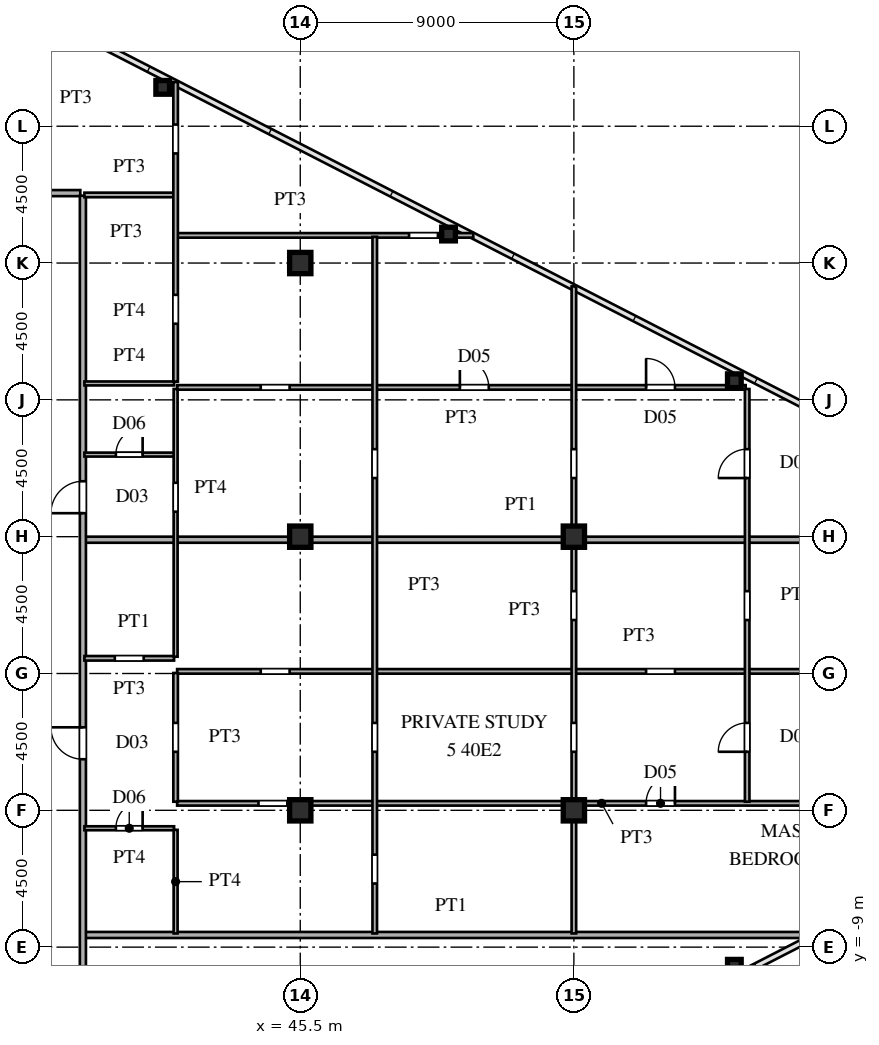
"""IFC4 building model, lengths in metres.
Left out: names, types, materials, properties, quantities, classifications, styles, units other than length and angle.
Written with IfcOpenShell. Run it as: python <this file> out.ifc"""

import sys

from ifc_helpers import new_model, si_unit, direction, frame, frame_2d, origin, origin_2d, place, context, subcontext, project, spatial, rectangle, hollow_rectangle, i_section, extrude, source, transform, mapped, element, fill, save


model = new_model("IFC4")
c1 = context("Model", 3, precision=1e-05, world=origin(), true_north=direction((0.0, 1.0)))
c2 = subcontext(c1, "Body", "Model", "MODEL_VIEW")
j1 = project(units=[si_unit("LENGTHUNIT", "METRE"), si_unit("PLANEANGLEUNIT", "RADIAN")], contexts=[c1])
p1 = place(None, origin())
s1 = spatial("IfcSite", under=j1, at=p1, CompositionType="ELEMENT")
p2 = place(p1, origin())
s2 = spatial("IfcBuilding", under=s1, at=p2, CompositionType="ELEMENT")
p3 = place(p2, frame((0.0, 0.0, 151.2)))
s3 = spatial("IfcBuildingStorey", under=s2, at=p3, CompositionType="ELEMENT", Elevation=151.2)
m1 = source(origin(), c2, "Body", "SweptSolid", [
    extrude(i_section(OverallWidth=0.7, OverallDepth=0.7, WebThickness=0.028, FlangeThickness=0.045, at=origin_2d()), origin(), (0.0, 0.0, 1.0), 3.6),
])
for number, where, z_axis, x_axis in (
    (1, (45.5, -4.5, 0.0), (0.0, 0.0, 1.0), (1.0, 0.0, 0.0)),
    (2, (45.5, 4.5, 0.0), (0.0, 0.0, 1.0), (1.0, 0.0, 0.0)),
    (3, (45.5, 13.5, 0.0), (0.0, 0.0, 1.0), (1.0, 0.0, 0.0)),
    (4, (54.5, -4.5, 0.0), (0.0, 0.0, 1.0), (1.0, 0.0, 0.0)),
    (5, (54.5, 4.5, 0.0), (0.0, 0.0, 1.0), (1.0, 0.0, 0.0)),
):
    element("IfcColumn", number, at=place(p3, frame(where, z_axis=z_axis, x_axis=x_axis)), inside=s3, PredefinedType="COLUMN", context=c2, shape_type="MappedRepresentation", body=[
        mapped(m1, transform((0.0, 0.0, 0.0), scale=1.0)),
    ])
m2 = source(origin(), c2, "Body", "SweptSolid", [
    extrude(hollow_rectangle(XDim=0.45, YDim=0.45, WallThickness=0.018, at=origin_2d()), origin(), (0.0, 0.0, 1.0), 3.6),
])
for number, where, z_axis, x_axis in (
    (6, (59.779, -9.629, 0.0), (0.0, 0.0, 1.0), (1.0, 0.0, 0.0)),
    (7, (40.976, 19.278, 0.0), (0.0, 0.0, 1.0), (1.0, 0.0, 0.0)),
    (8, (50.377, 14.453, 0.0), (0.0, 0.0, 1.0), (1.0, 0.0, 0.0)),
    (9, (59.779, 9.629, 0.0), (0.0, 0.0, 1.0), (1.0, 0.0, 0.0)),
):
    element("IfcColumn", number, at=place(p3, frame(where, z_axis=z_axis, x_axis=x_axis)), inside=s3, PredefinedType="COLUMN", context=c2, shape_type="MappedRepresentation", body=[
        mapped(m2, transform((0.0, 0.0, 0.0), scale=1.0)),
    ])
p4 = place(p3, frame((38.43, -8.6, 0.0), z_axis=(0.0, 0.0, 1.0), x_axis=(1.0, 0.0, 0.0)))
e10 = element("IfcWall", 10, at=p4, inside=s3, PredefinedType="PARTITIONING", context=c2, shape_type="SweptSolid", body=[
    extrude(rectangle(XDim=24.066, YDim=0.2, at=frame_2d((12.033, 0.0))), origin(), (0.0, 0.0, 1.0), 3.38),
])
p5 = place(p3, frame((38.4, -5.09, 0.0), z_axis=(0.0, 0.0, 1.0), x_axis=(1.0, 0.0, 0.0)))
e11 = element("IfcWall", 11, at=p5, inside=s3, PredefinedType="PARTITIONING", context=c2, shape_type="SweptSolid", body=[
    extrude(rectangle(XDim=2.95, YDim=0.13, at=frame_2d((1.475, 0.0))), origin(), (0.0, 0.0, 1.0), 3.38),
])
p6 = place(p5, frame((1.035, 0.0, 0.0)))
e12 = element("IfcOpeningElement", 12, at=p6, cuts=e11, PredefinedType="OPENING", context=c2, shape_type="SweptSolid", body=[
    extrude(rectangle(XDim=0.88, YDim=2.1, at=frame_2d((0.44, 1.05))), frame((0.0, 0.075, 0.0), z_axis=(0.0, -1.0, 0.0), x_axis=(1.0, 0.0, 0.0)), (0.0, 0.0, 1.0), 0.15),
])
p7 = place(p3, frame((41.45, -4.27, 0.0), z_axis=(0.0, 0.0, 1.0), x_axis=(1.0, 0.0, 0.0)))
e13 = element("IfcWall", 13, at=p7, inside=s3, PredefinedType="PARTITIONING", context=c2, shape_type="SweptSolid", body=[
    extrude(rectangle(XDim=27.925, YDim=0.15, at=frame_2d((13.962, 0.0))), origin(), (0.0, 0.0, 1.0), 3.38),
])
p8 = place(p7, frame((2.676, 0.0, 0.0)))
e14 = element("IfcOpeningElement", 14, at=p8, cuts=e13, PredefinedType="OPENING", context=c2, shape_type="SweptSolid", body=[
    extrude(rectangle(XDim=0.95, YDim=2.15, at=frame_2d((0.475, 1.075))), frame((0.0, 0.085, 0.0), z_axis=(0.0, -1.0, 0.0), x_axis=(1.0, 0.0, 0.0)), (0.0, 0.0, 1.0), 0.17),
])
p9 = place(p7, frame((15.425, 0.0, 0.0)))
e15 = element("IfcOpeningElement", 15, at=p9, cuts=e13, PredefinedType="OPENING", context=c2, shape_type="SweptSolid", body=[
    extrude(rectangle(XDim=0.95, YDim=2.15, at=frame_2d((0.475, 1.075))), frame((0.0, 0.085, 0.0), z_axis=(0.0, -1.0, 0.0), x_axis=(1.0, 0.0, 0.0)), (0.0, 0.0, 1.0), 0.17),
])
p10 = place(p3, frame((41.45, 0.07, 0.0), z_axis=(0.0, 0.0, 1.0), x_axis=(1.0, 0.0, 0.0)))
e16 = element("IfcWall", 16, at=p10, inside=s3, PredefinedType="PARTITIONING", context=c2, shape_type="SweptSolid", body=[
    extrude(rectangle(XDim=28.085, YDim=0.15, at=frame_2d((14.042, 0.0))), origin(), (0.0, 0.0, 1.0), 3.38),
])
p11 = place(p10, frame((2.75, 0.0, 0.0)))
e17 = element("IfcOpeningElement", 17, at=p11, cuts=e16, PredefinedType="OPENING", context=c2, shape_type="SweptSolid", body=[
    extrude(rectangle(XDim=0.95, YDim=2.15, at=frame_2d((0.475, 1.075))), frame((0.0, 0.085, 0.0), z_axis=(0.0, -1.0, 0.0), x_axis=(1.0, 0.0, 0.0)), (0.0, 0.0, 1.0), 0.17),
])
p12 = place(p10, frame((15.425, 0.0, 0.0)))
e18 = element("IfcOpeningElement", 18, at=p12, cuts=e16, PredefinedType="OPENING", context=c2, shape_type="SweptSolid", body=[
    extrude(rectangle(XDim=0.95, YDim=2.15, at=frame_2d((0.475, 1.075))), frame((0.0, 0.085, 0.0), z_axis=(0.0, -1.0, 0.0), x_axis=(1.0, 0.0, 0.0)), (0.0, 0.0, 1.0), 0.17),
])
p13 = place(p3, frame((38.4, 0.5, 0.0), z_axis=(0.0, 0.0, 1.0), x_axis=(1.0, 0.0, 0.0)))
e19 = element("IfcWall", 19, at=p13, inside=s3, PredefinedType="PARTITIONING", context=c2, shape_type="SweptSolid", body=[
    extrude(rectangle(XDim=2.95, YDim=0.15, at=frame_2d((1.475, 0.0))), origin(), (0.0, 0.0, 1.0), 3.38),
])
p14 = place(p13, frame((1.0, 0.0, 0.0)))
e20 = element("IfcOpeningElement", 20, at=p14, cuts=e19, PredefinedType="OPENING", context=c2, shape_type="SweptSolid", body=[
    extrude(rectangle(XDim=0.95, YDim=2.15, at=frame_2d((0.475, 1.075))), frame((0.0, 0.085, 0.0), z_axis=(0.0, -1.0, 0.0), x_axis=(1.0, 0.0, 0.0)), (0.0, 0.0, 1.0), 0.17),
])
p15 = place(p3, frame((38.43, 4.4, 0.0), z_axis=(0.0, 0.0, 1.0), x_axis=(1.0, 0.0, 0.0)))
e21 = element("IfcWall", 21, at=p15, inside=s3, PredefinedType="PARTITIONING", context=c2, shape_type="SweptSolid", body=[
    extrude(rectangle(XDim=16.09, YDim=0.2, at=frame_2d((8.045, 0.0))), origin(), (0.0, 0.0, 1.0), 2.78),
])
p16 = place(p3, frame((54.52, 4.4, 0.0), z_axis=(0.0, 0.0, 1.0), x_axis=(1.0, 0.0, 0.0)))
e22 = element("IfcWall", 22, at=p16, inside=s3, PredefinedType="PARTITIONING", context=c2, shape_type="SweptSolid", body=[
    extrude(rectangle(XDim=14.855, YDim=0.2, at=frame_2d((7.427, 0.0))), origin(), (0.0, 0.0, 1.0), 3.38),
])
p17 = place(p3, frame((38.4, 7.2, 0.0), z_axis=(0.0, 0.0, 1.0), x_axis=(1.0, 0.0, 0.0)))
e23 = element("IfcWall", 23, at=p17, inside=s3, PredefinedType="PARTITIONING", context=c2, shape_type="SweptSolid", body=[
    extrude(rectangle(XDim=2.95, YDim=0.13, at=frame_2d((1.475, 0.0))), origin(), (0.0, 0.0, 1.0), 3.38),
])
p18 = place(p17, frame((1.035, 0.0, 0.0)))
e24 = element("IfcOpeningElement", 24, at=p18, cuts=e23, PredefinedType="OPENING", context=c2, shape_type="SweptSolid", body=[
    extrude(rectangle(XDim=0.88, YDim=2.1, at=frame_2d((0.44, 1.05))), frame((0.0, 0.075, 0.0), z_axis=(0.0, -1.0, 0.0), x_axis=(1.0, 0.0, 0.0)), (0.0, 0.0, 1.0), 0.15),
])
p19 = place(p3, frame((41.45, 9.41, 0.0), z_axis=(0.0, 0.0, 1.0), x_axis=(1.0, 0.0, 0.0)))
e25 = element("IfcWall", 25, at=p19, inside=s3, PredefinedType="PARTITIONING", context=c2, shape_type="SweptSolid", body=[
    extrude(rectangle(XDim=18.7, YDim=0.15, at=frame_2d((9.35, 0.0))), origin(), (0.0, 0.0, 1.0), 3.38),
])
p20 = place(p19, frame((2.75, 0.0, 0.0)))
e26 = element("IfcOpeningElement", 26, at=p20, cuts=e25, PredefinedType="OPENING", context=c2, shape_type="SweptSolid", body=[
    extrude(rectangle(XDim=0.95, YDim=2.15, at=frame_2d((0.475, 1.075))), frame((0.0, 0.085, 0.0), z_axis=(0.0, -1.0, 0.0), x_axis=(1.0, 0.0, 0.0)), (0.0, 0.0, 1.0), 0.17),
])
p21 = place(p19, frame((15.425, 0.0, 0.0)))
e27 = element("IfcOpeningElement", 27, at=p21, cuts=e25, PredefinedType="OPENING", context=c2, shape_type="SweptSolid", body=[
    extrude(rectangle(XDim=0.95, YDim=2.15, at=frame_2d((0.475, 1.075))), frame((0.0, 0.085, 0.0), z_axis=(0.0, -1.0, 0.0), x_axis=(1.0, 0.0, 0.0)), (0.0, 0.0, 1.0), 0.17),
])
p22 = place(p19, frame((9.3, 0.0, 0.0)))
e28 = element("IfcOpeningElement", 28, at=p22, cuts=e25, PredefinedType="OPENING", context=c2, shape_type="SweptSolid", body=[
    extrude(rectangle(XDim=0.95, YDim=2.15, at=frame_2d((0.475, 1.075))), frame((0.0, 0.085, 0.0), z_axis=(0.0, -1.0, 0.0), x_axis=(1.0, 0.0, 0.0)), (0.0, 0.0, 1.0), 0.17),
])
p23 = place(p3, frame((38.4, 9.54, 0.0), z_axis=(0.0, 0.0, 1.0), x_axis=(1.0, 0.0, 0.0)))
e29 = element("IfcWall", 29, at=p23, inside=s3, PredefinedType="PARTITIONING", context=c2, shape_type="SweptSolid", body=[
    extrude(rectangle(XDim=2.95, YDim=0.13, at=frame_2d((1.475, 0.0))), origin(), (0.0, 0.0, 1.0), 3.38),
])
p24 = place(p3, frame((41.45, 14.41, 0.0), z_axis=(0.0, 0.0, 1.0), x_axis=(1.0, 0.0, 0.0)))
e30 = element("IfcWall", 30, at=p24, inside=s3, PredefinedType="PARTITIONING", context=c2, shape_type="SweptSolid", body=[
    extrude(rectangle(XDim=9.741, YDim=0.15, at=frame_2d((4.871, 0.0))), origin(), (0.0, 0.0, 1.0), 2.78),
])
p25 = place(p24, frame((7.628, 0.0, 0.0)))
e31 = element("IfcOpeningElement", 31, at=p25, cuts=e30, PredefinedType="OPENING", context=c2, shape_type="SweptSolid", body=[
    extrude(rectangle(XDim=0.95, YDim=2.15, at=frame_2d((0.475, 1.075))), frame((0.0, 0.085, 0.0), z_axis=(0.0, -1.0, 0.0), x_axis=(1.0, 0.0, 0.0)), (0.0, 0.0, 1.0), 0.17),
])
p26 = place(p3, frame((38.4, 15.74, 0.0), z_axis=(0.0, 0.0, 1.0), x_axis=(1.0, 0.0, 0.0)))
e32 = element("IfcWall", 32, at=p26, inside=s3, PredefinedType="PARTITIONING", context=c2, shape_type="SweptSolid", body=[
    extrude(rectangle(XDim=2.95, YDim=0.15, at=frame_2d((1.475, 0.0))), origin(), (0.0, 0.0, 1.0), 3.38),
])
p27 = place(p3, frame((27.5, 15.8, 0.0), z_axis=(0.0, 0.0, 1.0), x_axis=(1.0, 0.0, 0.0)))
e33 = element("IfcWall", 33, at=p27, inside=s3, PredefinedType="PARTITIONING", context=c2, shape_type="SweptSolid", body=[
    extrude(rectangle(XDim=10.765, YDim=0.2, at=frame_2d((5.382, 0.0))), origin(), (0.0, 0.0, 1.0), 3.38),
])
p28 = place(p3, frame((38.35, -15.715, 0.0), z_axis=(0.0, 0.0, 1.0), x_axis=(0.0, 1.0, 0.0)))
e34 = element("IfcWall", 34, at=p28, inside=s3, PredefinedType="PARTITIONING", context=c2, shape_type="SweptSolid", body=[
    extrude(rectangle(XDim=31.43, YDim=0.2, at=frame_2d((15.715, 0.0))), origin(), (0.0, 0.0, 1.0), 3.38),
])
p29 = place(p28, frame((2.99, 0.0, 0.0)))
e35 = element("IfcOpeningElement", 35, at=p29, cuts=e34, PredefinedType="OPENING", context=c2, shape_type="SweptSolid", body=[
    extrude(rectangle(XDim=1.05, YDim=2.25, at=frame_2d((0.525, 1.125))), frame((0.0, 0.11, 0.0), z_axis=(0.0, -1.0, 0.0), x_axis=(1.0, 0.0, 0.0)), (0.0, 0.0, 1.0), 0.22),
])
p30 = place(p28, frame((12.895, 0.0, 0.0)))
e36 = element("IfcOpeningElement", 36, at=p30, cuts=e34, PredefinedType="OPENING", context=c2, shape_type="SweptSolid", body=[
    extrude(rectangle(XDim=1.05, YDim=2.25, at=frame_2d((0.525, 1.125))), frame((0.0, 0.11, 0.0), z_axis=(0.0, -1.0, 0.0), x_axis=(1.0, 0.0, 0.0)), (0.0, 0.0, 1.0), 0.22),
])
p31 = place(p28, frame((20.988, 0.0, 0.0)))
e37 = element("IfcOpeningElement", 37, at=p31, cuts=e34, PredefinedType="OPENING", context=c2, shape_type="SweptSolid", body=[
    extrude(rectangle(XDim=1.05, YDim=2.25, at=frame_2d((0.525, 1.125))), frame((0.0, 0.11, 0.0), z_axis=(0.0, -1.0, 0.0), x_axis=(1.0, 0.0, 0.0)), (0.0, 0.0, 1.0), 0.22),
])
p32 = place(p3, frame((41.4, -8.55, 0.0), z_axis=(0.0, 0.0, 1.0), x_axis=(0.0, 1.0, 0.0)))
e38 = element("IfcWall", 38, at=p32, inside=s3, PredefinedType="PARTITIONING", context=c2, shape_type="SweptSolid", body=[
    extrude(rectangle(XDim=3.408, YDim=0.13, at=frame_2d((1.704, 0.0))), origin(), (0.0, 0.0, 1.0), 3.38),
])
p33 = place(p3, frame((41.4, -4.217, 0.0), z_axis=(0.0, 0.0, 1.0), x_axis=(0.0, 1.0, 0.0)))
e39 = element("IfcWall", 39, at=p33, inside=s3, PredefinedType="PARTITIONING", context=c2, shape_type="SweptSolid", body=[
    extrude(rectangle(XDim=4.234, YDim=0.15, at=frame_2d((2.117, 0.0))), origin(), (0.0, 0.0, 1.0), 3.38),
])
p34 = place(p33, frame((1.642, 0.0, 0.0)))
e40 = element("IfcOpeningElement", 40, at=p34, cuts=e39, PredefinedType="OPENING", context=c2, shape_type="SweptSolid", body=[
    extrude(rectangle(XDim=0.95, YDim=2.15, at=frame_2d((0.475, 1.075))), frame((0.0, 0.085, 0.0), z_axis=(0.0, -1.0, 0.0), x_axis=(1.0, 0.0, 0.0)), (0.0, 0.0, 1.0), 0.17),
])
p35 = place(p3, frame((41.4, 0.552, 0.0), z_axis=(0.0, 0.0, 1.0), x_axis=(0.0, 1.0, 0.0)))
e41 = element("IfcWall", 41, at=p35, inside=s3, PredefinedType="PARTITIONING", context=c2, shape_type="SweptSolid", body=[
    extrude(rectangle(XDim=8.805, YDim=0.13, at=frame_2d((4.402, 0.0))), origin(), (0.0, 0.0, 1.0), 3.38),
])
p36 = place(p35, frame((4.771, 0.0, 0.0)))
e42 = element("IfcOpeningElement", 42, at=p36, cuts=e41, PredefinedType="OPENING", context=c2, shape_type="SweptSolid", body=[
    extrude(rectangle(XDim=0.95, YDim=2.15, at=frame_2d((0.475, 1.075))), frame((0.0, 0.075, 0.0), z_axis=(0.0, -1.0, 0.0), x_axis=(1.0, 0.0, 0.0)), (0.0, 0.0, 1.0), 0.15),
])
p37 = place(p3, frame((41.4, 9.595, 0.0), z_axis=(0.0, 0.0, 1.0), x_axis=(0.0, 1.0, 0.0)))
e43 = element("IfcWall", 43, at=p37, inside=s3, PredefinedType="PARTITIONING", context=c2, shape_type="SweptSolid", body=[
    extrude(rectangle(XDim=9.86, YDim=0.15, at=frame_2d((4.93, 0.0))), origin(), (0.0, 0.0, 1.0), 3.38),
])
p38 = place(p37, frame((1.909, 0.0, 0.0)))
e44 = element("IfcOpeningElement", 44, at=p38, cuts=e43, PredefinedType="OPENING", context=c2, shape_type="SweptSolid", body=[
    extrude(rectangle(XDim=0.95, YDim=2.15, at=frame_2d((0.475, 1.075))), frame((0.0, 0.085, 0.0), z_axis=(0.0, -1.0, 0.0), x_axis=(1.0, 0.0, 0.0)), (0.0, 0.0, 1.0), 0.17),
])
p39 = place(p37, frame((7.51, 0.0, 0.0)))
e45 = element("IfcOpeningElement", 45, at=p39, cuts=e43, PredefinedType="OPENING", context=c2, shape_type="SweptSolid", body=[
    extrude(rectangle(XDim=0.95, YDim=2.15, at=frame_2d((0.475, 1.075))), frame((0.0, 0.085, 0.0), z_axis=(0.0, -1.0, 0.0), x_axis=(1.0, 0.0, 0.0)), (0.0, 0.0, 1.0), 0.17),
])
p40 = place(p3, frame((47.95, -8.55, 0.0), z_axis=(0.0, 0.0, 1.0), x_axis=(0.0, 1.0, 0.0)))
e46 = element("IfcWall", 46, at=p40, inside=s3, PredefinedType="PARTITIONING", context=c2, shape_type="SweptSolid", body=[
    extrude(rectangle(XDim=22.913, YDim=0.15, at=frame_2d((11.457, 0.0))), origin(), (0.0, 0.0, 1.0), 3.38),
])
p41 = place(p40, frame((5.975, 0.0, 0.0)))
e47 = element("IfcOpeningElement", 47, at=p41, cuts=e46, PredefinedType="OPENING", context=c2, shape_type="SweptSolid", body=[
    extrude(rectangle(XDim=0.95, YDim=2.15, at=frame_2d((0.475, 1.075))), frame((0.0, 0.085, 0.0), z_axis=(0.0, -1.0, 0.0), x_axis=(1.0, 0.0, 0.0)), (0.0, 0.0, 1.0), 0.17),
])
p42 = place(p40, frame((1.642, 0.0, 0.0)))
e48 = element("IfcOpeningElement", 48, at=p42, cuts=e46, PredefinedType="OPENING", context=c2, shape_type="SweptSolid", body=[
    extrude(rectangle(XDim=0.95, YDim=2.15, at=frame_2d((0.475, 1.075))), frame((0.0, 0.085, 0.0), z_axis=(0.0, -1.0, 0.0), x_axis=(1.0, 0.0, 0.0)), (0.0, 0.0, 1.0), 0.17),
])
p43 = place(p40, frame((14.978, 0.0, 0.0)))
e49 = element("IfcOpeningElement", 49, at=p43, cuts=e46, PredefinedType="OPENING", context=c2, shape_type="SweptSolid", body=[
    extrude(rectangle(XDim=0.95, YDim=2.15, at=frame_2d((0.475, 1.075))), frame((0.0, 0.085, 0.0), z_axis=(0.0, -1.0, 0.0), x_axis=(1.0, 0.0, 0.0)), (0.0, 0.0, 1.0), 0.17),
])
p44 = place(p3, frame((54.5, -8.55, 0.0), z_axis=(0.0, 0.0, 1.0), x_axis=(0.0, 1.0, 0.0)))
e50 = element("IfcWall", 50, at=p44, inside=s3, PredefinedType="PARTITIONING", context=c2, shape_type="SweptSolid", body=[
    extrude(rectangle(XDim=21.282, YDim=0.15, at=frame_2d((10.641, 0.0))), origin(), (0.0, 0.0, 1.0), 2.78),
])
p45 = place(p44, frame((5.975, 0.0, 0.0)))
e51 = element("IfcOpeningElement", 51, at=p45, cuts=e50, PredefinedType="OPENING", context=c2, shape_type="SweptSolid", body=[
    extrude(rectangle(XDim=0.95, YDim=2.15, at=frame_2d((0.475, 1.075))), frame((0.0, 0.085, 0.0), z_axis=(0.0, -1.0, 0.0), x_axis=(1.0, 0.0, 0.0)), (0.0, 0.0, 1.0), 0.17),
])
p46 = place(p44, frame((10.308, 0.0, 0.0)))
e52 = element("IfcOpeningElement", 52, at=p46, cuts=e50, PredefinedType="OPENING", context=c2, shape_type="SweptSolid", body=[
    extrude(rectangle(XDim=0.95, YDim=2.15, at=frame_2d((0.475, 1.075))), frame((0.0, 0.085, 0.0), z_axis=(0.0, -1.0, 0.0), x_axis=(1.0, 0.0, 0.0)), (0.0, 0.0, 1.0), 0.17),
])
p47 = place(p44, frame((14.978, 0.0, 0.0)))
e53 = element("IfcOpeningElement", 53, at=p47, cuts=e50, PredefinedType="OPENING", context=c2, shape_type="SweptSolid", body=[
    extrude(rectangle(XDim=0.95, YDim=2.15, at=frame_2d((0.475, 1.075))), frame((0.0, 0.085, 0.0), z_axis=(0.0, -1.0, 0.0), x_axis=(1.0, 0.0, 0.0)), (0.0, 0.0, 1.0), 0.17),
])
p48 = place(p3, frame((60.2, -4.217, 0.0), z_axis=(0.0, 0.0, 1.0), x_axis=(0.0, 1.0, 0.0)))
e54 = element("IfcWall", 54, at=p48, inside=s3, PredefinedType="PARTITIONING", context=c2, shape_type="SweptSolid", body=[
    extrude(rectangle(XDim=13.574, YDim=0.15, at=frame_2d((6.787, 0.0))), origin(), (0.0, 0.0, 1.0), 3.38),
])
p49 = place(p48, frame((1.642, 0.0, 0.0)))
e55 = element("IfcOpeningElement", 55, at=p49, cuts=e54, PredefinedType="OPENING", context=c2, shape_type="SweptSolid", body=[
    extrude(rectangle(XDim=0.95, YDim=2.15, at=frame_2d((0.475, 1.075))), frame((0.0, 0.085, 0.0), z_axis=(0.0, -1.0, 0.0), x_axis=(1.0, 0.0, 0.0)), (0.0, 0.0, 1.0), 0.17),
])
p50 = place(p48, frame((5.975, 0.0, 0.0)))
e56 = element("IfcOpeningElement", 56, at=p50, cuts=e54, PredefinedType="OPENING", context=c2, shape_type="SweptSolid", body=[
    extrude(rectangle(XDim=0.95, YDim=2.15, at=frame_2d((0.475, 1.075))), frame((0.0, 0.085, 0.0), z_axis=(0.0, -1.0, 0.0), x_axis=(1.0, 0.0, 0.0)), (0.0, 0.0, 1.0), 0.17),
])
p51 = place(p48, frame((10.645, 0.0, 0.0)))
e57 = element("IfcOpeningElement", 57, at=p51, cuts=e54, PredefinedType="OPENING", context=c2, shape_type="SweptSolid", body=[
    extrude(rectangle(XDim=0.95, YDim=2.15, at=frame_2d((0.475, 1.075))), frame((0.0, 0.085, 0.0), z_axis=(0.0, -1.0, 0.0), x_axis=(1.0, 0.0, 0.0)), (0.0, 0.0, 1.0), 0.17),
])
m3 = source(origin(), c2, "Body", "SweptSolid", [
    extrude(rectangle(XDim=0.88, YDim=2.1, at=frame_2d((0.44, 1.05))), frame((0.0, 0.025, 0.0), z_axis=(0.0, -1.0, 0.0), x_axis=(1.0, 0.0, 0.0)), (0.0, 0.0, 1.0), 0.05),
])
p52 = place(p6, origin())
e58 = element("IfcDoor", 58, at=p52, inside=s3, OperationType="SINGLE_SWING_RIGHT", PredefinedType="DOOR", context=c2, shape_type="MappedRepresentation", body=[
    mapped(m3, transform((0.0, 0.0, 0.0), scale=1.0)),
])
fill(e12, e58)
m4 = source(origin(), c2, "Body", "SweptSolid", [
    extrude(rectangle(XDim=0.95, YDim=2.15, at=frame_2d((0.475, 1.075))), frame((0.0, 0.025, 0.0), z_axis=(0.0, -1.0, 0.0), x_axis=(1.0, 0.0, 0.0)), (0.0, 0.0, 1.0), 0.05),
])
p53 = place(p9, origin())
e59 = element("IfcDoor", 59, at=p53, inside=s3, OperationType="SINGLE_SWING_RIGHT", PredefinedType="DOOR", context=c2, shape_type="MappedRepresentation", body=[
    mapped(m4, transform((0.0, 0.0, 0.0), scale=1.0)),
])
fill(e15, e59)
p54 = place(p18, origin())
e60 = element("IfcDoor", 60, at=p54, inside=s3, OperationType="SINGLE_SWING_RIGHT", PredefinedType="DOOR", context=c2, shape_type="MappedRepresentation", body=[
    mapped(m3, transform((0.0, 0.0, 0.0), scale=1.0)),
])
fill(e24, e60)
p55 = place(p21, origin())
e61 = element("IfcDoor", 61, at=p55, inside=s3, OperationType="SINGLE_SWING_LEFT", PredefinedType="DOOR", context=c2, shape_type="MappedRepresentation", body=[
    mapped(m4, transform((0.0, 0.0, 0.0), scale=1.0)),
])
fill(e27, e61)
p56 = place(p22, origin())
e62 = element("IfcDoor", 62, at=p56, inside=s3, OperationType="SINGLE_SWING_LEFT", PredefinedType="DOOR", context=c2, shape_type="MappedRepresentation", body=[
    mapped(m4, transform((0.0, 0.0, 0.0), scale=1.0)),
])
fill(e28, e62)
m5 = source(origin(), c2, "Body", "SweptSolid", [
    extrude(rectangle(XDim=1.05, YDim=2.25, at=frame_2d((0.525, 1.125))), frame((0.0, 0.025, 0.0), z_axis=(0.0, -1.0, 0.0), x_axis=(1.0, 0.0, 0.0)), (0.0, 0.0, 1.0), 0.05),
])
p57 = place(p30, origin())
e63 = element("IfcDoor", 63, at=p57, inside=s3, OperationType="SINGLE_SWING_RIGHT", PredefinedType="DOOR", context=c2, shape_type="MappedRepresentation", body=[
    mapped(m5, transform((0.0, 0.0, 0.0), scale=1.0)),
])
fill(e36, e63)
p58 = place(p31, origin())
e64 = element("IfcDoor", 64, at=p58, inside=s3, OperationType="SINGLE_SWING_LEFT", PredefinedType="DOOR", context=c2, shape_type="MappedRepresentation", body=[
    mapped(m5, transform((0.0, 0.0, 0.0), scale=1.0)),
])
fill(e37, e64)
p59 = place(p49, origin())
e65 = element("IfcDoor", 65, at=p59, inside=s3, OperationType="SINGLE_SWING_LEFT", PredefinedType="DOOR", context=c2, shape_type="MappedRepresentation", body=[
    mapped(m4, transform((0.0, 0.0, 0.0), scale=1.0)),
])
fill(e55, e65)
p60 = place(p51, origin())
e66 = element("IfcDoor", 66, at=p60, inside=s3, OperationType="SINGLE_SWING_LEFT", PredefinedType="DOOR", context=c2, shape_type="MappedRepresentation", body=[
    mapped(m4, transform((0.0, 0.0, 0.0), scale=1.0)),
])
fill(e57, e66)
save(model, sys.argv[1])
